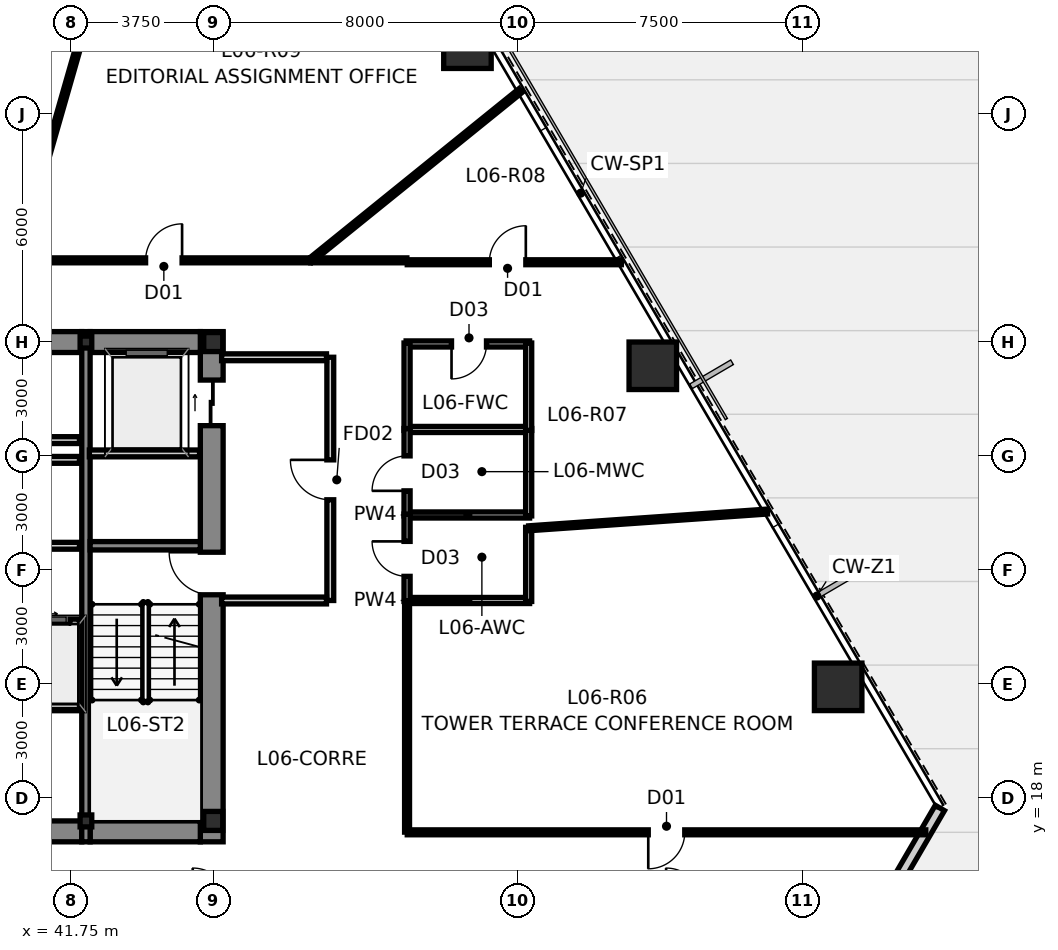
"""IFC4 building model, lengths in metres.
Left out: names, types, materials, properties, quantities, classifications, styles, units other than length and angle.
Written with IfcOpenShell. Run it as: python <this file> out.ifc"""

import sys

from ifc_helpers import new_model, si_unit, direction, frame, frame_2d, origin, origin_2d, place, context, subcontext, project, spatial, rectangle, hollow_rectangle, i_section, extrude, source, transform, mapped, element, fill, save


model = new_model("IFC4")
c1 = context("Model", 3, precision=1e-05, world=origin(), true_north=direction((0.0, 1.0)))
c2 = subcontext(c1, "Body", "Model", "MODEL_VIEW")
j1 = project(units=[si_unit("LENGTHUNIT", "METRE"), si_unit("PLANEANGLEUNIT", "RADIAN")], contexts=[c1])
p1 = place(None, origin())
s1 = spatial("IfcSite", under=j1, at=p1, CompositionType="ELEMENT")
p2 = place(p1, origin())
s2 = spatial("IfcBuilding", under=s1, at=p2, CompositionType="ELEMENT")
p3 = place(p2, frame((0.0, 0.0, 27.6)))
s3 = spatial("IfcBuildingStorey", under=s2, at=p3, CompositionType="ELEMENT", Elevation=27.6)
m1 = source(origin(), c2, "Body", "SweptSolid", [
    extrude(i_section(OverallWidth=0.5, OverallDepth=0.5, WebThickness=0.028, FlangeThickness=0.04, at=origin_2d()), origin(), (0.0, 0.0, 1.0), 3.65),
])
for number, where, z_axis, x_axis in (
    (1, (45.5, 17.4, 0.0), (0.0, 0.0, 1.0), (1.0, 0.0, 0.0)),
    (2, (45.5, 30.0, 0.0), (0.0, 0.0, 1.0), (1.0, 0.0, 0.0)),
):
    element("IfcColumn", number, at=place(p3, frame(where, z_axis=z_axis, x_axis=x_axis)), inside=s3, PredefinedType="COLUMN", context=c2, shape_type="MappedRepresentation", body=[
        mapped(m1, transform((0.0, 0.0, 0.0), scale=1.0)),
    ])
m2 = source(origin(), c2, "Body", "SweptSolid", [
    extrude(i_section(OverallWidth=0.307, OverallDepth=0.315, WebThickness=0.012, FlangeThickness=0.019, at=origin_2d()), origin(), (0.0, 0.0, 1.0), 3.65),
])
for number, where, z_axis, x_axis in (
    (3, (42.15, 17.4, 0.0), (0.0, 0.0, 1.0), (1.0, 0.0, 0.0)),
    (4, (42.15, 30.0, 0.0), (0.0, 0.0, 1.0), (1.0, 0.0, 0.0)),
):
    element("IfcColumn", number, at=place(p3, frame(where, z_axis=z_axis, x_axis=x_axis)), inside=s3, PredefinedType="COLUMN", context=c2, shape_type="MappedRepresentation", body=[
        mapped(m2, transform((0.0, 0.0, 0.0), scale=1.0)),
    ])
p4 = place(p3, frame((45.46, 16.85, 0.0), z_axis=(0.0, 0.0, 1.0), x_axis=(0.0, 1.0, 0.0)))
e5 = element("IfcWall", 5, at=p4, inside=s3, PredefinedType="SHEAR", context=c2, shape_type="SweptSolid", body=[
    extrude(rectangle(XDim=13.425, YDim=0.6, at=frame_2d((6.712, 0.0))), origin(), (0.0, 0.0, 1.0), 3.65),
])
p5 = place(p4, frame((6.5, 0.0, 0.0)))
e6 = element("IfcOpeningElement", 6, at=p5, cuts=e5, PredefinedType="OPENING", context=c2, shape_type="SweptSolid", body=[
    extrude(rectangle(XDim=1.12, YDim=2.15, at=frame_2d((0.56, 1.075))), frame((0.0, 0.312, 0.0), z_axis=(0.0, -1.0, 0.0), x_axis=(1.0, 0.0, 0.0)), (0.0, 0.0, 1.0), 0.624),
])
p6 = place(p4, frame((10.95, 0.0, 0.0)))
e7 = element("IfcOpeningElement", 7, at=p6, cuts=e5, PredefinedType="OPENING", context=c2, shape_type="SweptSolid", body=[
    extrude(rectangle(XDim=1.2, YDim=2.2, at=frame_2d((0.6, 1.1))), frame((0.0, 0.312, 0.0), z_axis=(0.0, -1.0, 0.0), x_axis=(1.0, 0.0, 0.0)), (0.0, 0.0, 1.0), 0.624),
])
p7 = place(p3, frame((33.96, 17.125, 0.0), z_axis=(0.0, 0.0, 1.0), x_axis=(1.0, 0.0, 0.0)))
e8 = element("IfcWall", 8, at=p7, inside=s3, PredefinedType="SHEAR", context=c2, shape_type="SweptSolid", body=[
    extrude(rectangle(XDim=8.08, YDim=0.55, at=frame_2d((4.04, 0.0))), origin(), (0.0, 0.0, 1.0), 3.65),
])
p8 = place(p3, frame((42.26, 17.125, 0.0), z_axis=(0.0, 0.0, 1.0), x_axis=(1.0, 0.0, 0.0)))
e9 = element("IfcWall", 9, at=p8, inside=s3, PredefinedType="SHEAR", context=c2, shape_type="SweptSolid", body=[
    extrude(rectangle(XDim=2.9, YDim=0.55, at=frame_2d((1.45, 0.0))), origin(), (0.0, 0.0, 1.0), 3.65),
])
p9 = place(p3, frame((40.16, 30.0, 0.0), z_axis=(0.0, 0.0, 1.0), x_axis=(1.0, 0.0, 0.0)))
e10 = element("IfcWall", 10, at=p9, inside=s3, PredefinedType="SHEAR", context=c2, shape_type="SweptSolid", body=[
    extrude(rectangle(XDim=1.88, YDim=0.55, at=frame_2d((0.94, 0.0))), origin(), (0.0, 0.0, 1.0), 3.65),
])
p10 = place(p3, frame((42.26, 30.0, 0.0), z_axis=(0.0, 0.0, 1.0), x_axis=(1.0, 0.0, 0.0)))
e11 = element("IfcWall", 11, at=p10, inside=s3, PredefinedType="SHEAR", context=c2, shape_type="SweptSolid", body=[
    extrude(rectangle(XDim=2.9, YDim=0.55, at=frame_2d((1.45, 0.0))), origin(), (0.0, 0.0, 1.0), 3.65),
])
p11 = place(p3, frame((42.15, 16.85, 0.0), z_axis=(0.0, 0.0, 1.0), x_axis=(0.0, 1.0, 0.0)))
e12 = element("IfcWall", 12, at=p11, inside=s3, PredefinedType="SHEAR", context=c2, shape_type="SweptSolid", body=[
    extrude(rectangle(XDim=13.425, YDim=0.22, at=frame_2d((6.712, 0.0))), origin(), (0.0, 0.0, 1.0), 3.65),
])
p12 = place(p3, frame((42.26, 24.64, 0.0), z_axis=(0.0, 0.0, 1.0), x_axis=(1.0, 0.0, 0.0)))
e13 = element("IfcWall", 13, at=p12, inside=s3, PredefinedType="SHEAR", context=c2, shape_type="SweptSolid", body=[
    extrude(rectangle(XDim=2.9, YDim=0.22, at=frame_2d((1.45, 0.0))), origin(), (0.0, 0.0, 1.0), 3.65),
])
m3 = source(origin(), c2, "Body", "SweptSolid", [
    extrude(hollow_rectangle(XDim=1.25, YDim=1.25, WallThickness=0.07, at=origin_2d()), origin(), (0.0, 0.0, 1.0), 3.651),
])
p13 = place(p3, frame((61.944, 20.928, 0.0), z_axis=(-0.010431795422, -0.021532295679, 0.999713727968), x_axis=(0.899947055326, -0.435999194506, 0.0)))
e14 = element("IfcColumn", 14, at=p13, inside=s3, PredefinedType="COLUMN", context=c2, shape_type="MappedRepresentation", body=[
    mapped(m3, transform((0.0, 0.0, 0.0), scale=1.0)),
])
m4 = source(origin(), c2, "Body", "SweptSolid", [
    extrude(hollow_rectangle(XDim=1.25, YDim=1.25, WallThickness=0.07, at=origin_2d()), origin(), (0.0, 0.0, 1.0), 3.651),
])
p14 = place(p3, frame((57.066, 29.376, 0.0), z_axis=(-0.014913313399, -0.013776424037, 0.999793880369), x_axis=(0.678553674548, -0.734550822447, 0.0)))
e15 = element("IfcColumn", 15, at=p14, inside=s3, PredefinedType="COLUMN", context=c2, shape_type="MappedRepresentation", body=[
    mapped(m4, transform((0.0, 0.0, 0.0), scale=1.0)),
])
m5 = source(origin(), c2, "Body", "SweptSolid", [
    extrude(hollow_rectangle(XDim=1.25, YDim=1.25, WallThickness=0.07, at=origin_2d()), origin(), (0.0, 0.0, 1.0), 3.901),
])
p15 = place(p3, frame((52.189, 37.824, -0.25), z_axis=(-0.018151222073, -0.005633137885, 0.999819384136), x_axis=(0.296399214872, -0.955064136811, 0.0)))
e16 = element("IfcColumn", 16, at=p15, inside=s3, PredefinedType="COLUMN", context=c2, shape_type="MappedRepresentation", body=[
    mapped(m5, transform((0.0, 0.0, 0.0), scale=1.0)),
])
p16 = place(p3, frame((64.621, 17.741, 0.0), z_axis=(0.0, 0.0, 1.0), x_axis=(-0.503266117349, -0.864131480233, 0.0)))
e17 = element("IfcWall", 17, at=p16, inside=s3, PredefinedType="STANDARD", context=c2, shape_type="SweptSolid", body=[
    extrude(rectangle(XDim=15.888, YDim=0.28, at=frame_2d((7.944, 0.0))), origin(), (0.0, 0.0, 1.0), 3.4),
])
p17 = place(p16, frame((6.19, 0.0, 0.0)))
e18 = element("IfcOpeningElement", 18, at=p17, cuts=e17, PredefinedType="OPENING", context=c2, shape_type="SweptSolid", body=[
    extrude(rectangle(XDim=1.1, YDim=2.2, at=frame_2d((0.55, 1.1))), frame((0.0, 0.152, 0.0), z_axis=(0.0, -1.0, 0.0), x_axis=(1.0, 0.0, 0.0)), (0.0, 0.0, 1.0), 0.304),
])
p18 = place(p3, frame((40.28, 22.62, 0.0), z_axis=(0.0, 0.0, 1.0), x_axis=(1.0, 0.0, 0.0)))
e19 = element("IfcWall", 19, at=p18, inside=s3, PredefinedType="PARTITIONING", context=c2, shape_type="SweptSolid", body=[
    extrude(rectangle(XDim=1.7, YDim=0.18, at=frame_2d((0.85, 0.0))), origin(), (0.0, 0.0, 1.0), 3.4),
])
p19 = place(p18, frame((0.35, 0.0, 0.0)))
e20 = element("IfcOpeningElement", 20, at=p19, cuts=e19, PredefinedType="OPENING", context=c2, shape_type="SweptSolid", body=[
    extrude(rectangle(XDim=1.1, YDim=2.2, at=frame_2d((0.55, 1.1))), frame((0.0, 0.102, 0.0), z_axis=(0.0, -1.0, 0.0), x_axis=(1.0, 0.0, 0.0)), (0.0, 0.0, 1.0), 0.204),
])
p20 = place(p3, frame((40.28, 26.9, 0.0), z_axis=(0.0, 0.0, 1.0), x_axis=(1.0, 0.0, 0.0)))
e21 = element("IfcWall", 21, at=p20, inside=s3, PredefinedType="PARTITIONING", context=c2, shape_type="SweptSolid", body=[
    extrude(rectangle(XDim=1.7, YDim=0.18, at=frame_2d((0.85, 0.0))), origin(), (0.0, 0.0, 1.0), 3.4),
])
p21 = place(p3, frame((40.2, 24.64, 0.0), z_axis=(0.0, 0.0, 1.0), x_axis=(1.0, 0.0, 0.0)))
e22 = element("IfcWall", 22, at=p21, inside=s3, PredefinedType="PARTITIONING", context=c2, shape_type="SweptSolid", body=[
    extrude(rectangle(XDim=1.78, YDim=0.18, at=frame_2d((0.89, 0.0))), origin(), (0.0, 0.0, 1.0), 3.4),
])
p22 = place(p3, frame((40.22, 27.42, 0.0), z_axis=(0.0, 0.0, 1.0), x_axis=(1.0, 0.0, 0.0)))
e23 = element("IfcWall", 23, at=p22, inside=s3, PredefinedType="PARTITIONING", context=c2, shape_type="SweptSolid", body=[
    extrude(rectangle(XDim=1.76, YDim=0.18, at=frame_2d((0.88, 0.0))), origin(), (0.0, 0.0, 1.0), 3.4),
])
p23 = place(p3, frame((48.58, 23.2, 0.0), z_axis=(0.0, 0.0, 1.0), x_axis=(0.0, 1.0, 0.0)))
e24 = element("IfcWall", 24, at=p23, inside=s3, PredefinedType="PARTITIONING", context=c2, shape_type="SweptSolid", body=[
    extrude(rectangle(XDim=6.4, YDim=0.18, at=frame_2d((3.2, 0.0))), origin(), (0.0, 0.0, 1.0), 3.4),
])
p24 = place(p23, frame((2.65, 0.0, 0.0)))
e25 = element("IfcOpeningElement", 25, at=p24, cuts=e24, PredefinedType="OPENING", context=c2, shape_type="SweptSolid", body=[
    extrude(rectangle(XDim=1.05, YDim=2.15, at=frame_2d((0.525, 1.075))), frame((0.0, 0.102, 0.0), z_axis=(0.0, -1.0, 0.0), x_axis=(1.0, 0.0, 0.0)), (0.0, 0.0, 1.0), 0.204),
])
p25 = place(p3, frame((45.72, 23.2, 0.0), z_axis=(0.0, 0.0, 1.0), x_axis=(1.0, 0.0, 0.0)))
e26 = element("IfcWall", 26, at=p25, inside=s3, PredefinedType="PARTITIONING", context=c2, shape_type="SweptSolid", body=[
    extrude(rectangle(XDim=2.76, YDim=0.18, at=frame_2d((1.38, 0.0))), origin(), (0.0, 0.0, 1.0), 3.4),
])
p26 = place(p3, frame((45.72, 29.6, 0.0), z_axis=(0.0, 0.0, 1.0), x_axis=(1.0, 0.0, 0.0)))
e27 = element("IfcWall", 27, at=p26, inside=s3, PredefinedType="PARTITIONING", context=c2, shape_type="SweptSolid", body=[
    extrude(rectangle(XDim=2.76, YDim=0.18, at=frame_2d((1.38, 0.0))), origin(), (0.0, 0.0, 1.0), 2.783),
])
p27 = place(p3, frame((42.24, 27.07, 0.0), z_axis=(0.0, 0.0, 1.0), x_axis=(1.0, 0.0, 0.0)))
e28 = element("IfcWall", 28, at=p27, inside=s3, PredefinedType="PARTITIONING", context=c2, shape_type="SweptSolid", body=[
    extrude(rectangle(XDim=2.9, YDim=0.18, at=frame_2d((1.45, 0.0))), origin(), (0.0, 0.0, 1.0), 3.4),
])
p28 = place(p3, frame((40.22, 20.42, 0.0), z_axis=(0.0, 0.0, 1.0), x_axis=(1.0, 0.0, 0.0)))
e29 = element("IfcWall", 29, at=p28, inside=s3, PredefinedType="PARTITIONING", context=c2, shape_type="SweptSolid", body=[
    extrude(rectangle(XDim=1.76, YDim=0.18, at=frame_2d((0.88, 0.0))), origin(), (0.0, 0.0, 1.0), 3.4),
])
for number, where, z_axis, x_axis in (
    (30, (50.575, 23.2, 0.0), (0.0, 0.0, 1.0), (1.0, 0.0, 0.0)),
    (31, (50.575, 25.45, 0.0), (0.0, 0.0, 1.0), (1.0, 0.0, 0.0)),
    (32, (50.575, 27.7, 0.0), (0.0, 0.0, 1.0), (1.0, 0.0, 0.0)),
):
    element("IfcWall", number, at=place(p3, frame(where, z_axis=z_axis, x_axis=x_axis)), inside=s3, PredefinedType="PLUMBINGWALL", context=c2, shape_type="SweptSolid", body=[
        extrude(rectangle(XDim=3.25, YDim=0.16, at=frame_2d((1.625, 0.0))), origin(), (0.0, 0.0, 1.0), 3.4),
    ])
p29 = place(p3, frame((53.825, 29.95, 0.0), z_axis=(0.0, 0.0, 1.0), x_axis=(-1.0, 0.0, 0.0)))
e33 = element("IfcWall", 33, at=p29, inside=s3, PredefinedType="PLUMBINGWALL", context=c2, shape_type="SweptSolid", body=[
    extrude(rectangle(XDim=3.25, YDim=0.16, at=frame_2d((1.625, 0.0))), origin(), (0.0, 0.0, 1.0), 2.783),
])
p30 = place(p29, frame((1.135, 0.0, 0.0)))
e34 = element("IfcOpeningElement", 34, at=p30, cuts=e33, PredefinedType="OPENING", context=c2, shape_type="SweptSolid", body=[
    extrude(rectangle(XDim=0.92, YDim=2.1, at=frame_2d((0.46, 1.05))), frame((0.0, 0.092, 0.0), z_axis=(0.0, -1.0, 0.0), x_axis=(1.0, 0.0, 0.0)), (0.0, 0.0, 1.0), 0.184),
])
p31 = place(p3, frame((50.6, 27.675, 0.0), z_axis=(0.0, 0.0, 1.0), x_axis=(0.0, 1.0, 0.0)))
e35 = element("IfcWall", 35, at=p31, inside=s3, PredefinedType="PLUMBINGWALL", context=c2, shape_type="SweptSolid", body=[
    extrude(rectangle(XDim=2.3, YDim=0.16, at=frame_2d((1.15, 0.0))), origin(), (0.0, 0.0, 1.0), 3.4),
])
p32 = place(p3, frame((50.6, 25.425, 0.0), z_axis=(0.0, 0.0, 1.0), x_axis=(0.0, 1.0, 0.0)))
e36 = element("IfcWall", 36, at=p32, inside=s3, PredefinedType="PLUMBINGWALL", context=c2, shape_type="SweptSolid", body=[
    extrude(rectangle(XDim=2.3, YDim=0.16, at=frame_2d((1.15, 0.0))), origin(), (0.0, 0.0, 1.0), 3.4),
])
p33 = place(p32, frame((0.66, 0.0, 0.0)))
e37 = element("IfcOpeningElement", 37, at=p33, cuts=e36, PredefinedType="OPENING", context=c2, shape_type="SweptSolid", body=[
    extrude(rectangle(XDim=0.92, YDim=2.1, at=frame_2d((0.46, 1.05))), frame((0.0, 0.092, 0.0), z_axis=(0.0, -1.0, 0.0), x_axis=(1.0, 0.0, 0.0)), (0.0, 0.0, 1.0), 0.184),
])
p34 = place(p3, frame((50.6, 23.175, 0.0), z_axis=(0.0, 0.0, 1.0), x_axis=(0.0, 1.0, 0.0)))
e38 = element("IfcWall", 38, at=p34, inside=s3, PredefinedType="PLUMBINGWALL", context=c2, shape_type="SweptSolid", body=[
    extrude(rectangle(XDim=2.3, YDim=0.16, at=frame_2d((1.15, 0.0))), origin(), (0.0, 0.0, 1.0), 3.026),
])
p35 = place(p34, frame((0.66, 0.0, 0.0)))
e39 = element("IfcOpeningElement", 39, at=p35, cuts=e38, PredefinedType="OPENING", context=c2, shape_type="SweptSolid", body=[
    extrude(rectangle(XDim=0.92, YDim=2.1, at=frame_2d((0.46, 1.05))), frame((0.0, 0.092, 0.0), z_axis=(0.0, -1.0, 0.0), x_axis=(1.0, 0.0, 0.0)), (0.0, 0.0, 1.0), 0.184),
])
for number, where, z_axis, x_axis in (
    (40, (53.8, 25.425, 0.0), (0.0, 0.0, 1.0), (0.0, 1.0, 0.0)),
    (41, (53.8, 27.675, 0.0), (0.0, 0.0, 1.0), (0.0, 1.0, 0.0)),
):
    element("IfcWall", number, at=place(p3, frame(where, z_axis=z_axis, x_axis=x_axis)), inside=s3, PredefinedType="PLUMBINGWALL", context=c2, shape_type="SweptSolid", body=[
        extrude(rectangle(XDim=2.3, YDim=0.16, at=frame_2d((1.15, 0.0))), origin(), (0.0, 0.0, 1.0), 3.026),
    ])
p36 = place(p3, frame((53.8, 23.175, 0.0), z_axis=(0.0, 0.0, 1.0), x_axis=(0.0, 1.0, 0.0)))
e42 = element("IfcWall", 42, at=p36, inside=s3, PredefinedType="PLUMBINGWALL", context=c2, shape_type="SweptSolid", body=[
    extrude(rectangle(XDim=1.95, YDim=0.16, at=frame_2d((0.975, 0.0))), origin(), (0.0, 0.0, 1.0), 3.4),
])
p37 = place(p3, frame((40.341, 32.155, 0.0), z_axis=(0.0, 0.0, 1.0), x_axis=(0.275627948864, 0.961264393289, 0.0)))
e43 = element("IfcWall", 43, at=p37, inside=s3, PredefinedType="PARTITIONING", context=c2, shape_type="SweptSolid", body=[
    extrude(rectangle(XDim=17.919, YDim=0.13, at=frame_2d((8.959, 0.0))), origin(), (0.0, 0.0, 1.0), 3.4),
])
p38 = place(p3, frame((64.25, 17.1, 0.0), z_axis=(0.0, 0.0, 1.0), x_axis=(-1.0, 0.0, 0.0)))
e44 = element("IfcWall", 44, at=p38, inside=s3, PredefinedType="PARTITIONING", context=c2, shape_type="SweptSolid", body=[
    extrude(rectangle(XDim=13.645, YDim=0.13, at=frame_2d((6.823, 0.0))), origin(), (0.0, 0.0, 1.0), 3.4),
])
p39 = place(p38, frame((6.343, 0.0, 0.0)))
e45 = element("IfcOpeningElement", 45, at=p39, cuts=e44, PredefinedType="OPENING", context=c2, shape_type="SweptSolid", body=[
    extrude(rectangle(XDim=0.96, YDim=2.15, at=frame_2d((0.48, 1.075))), frame((0.0, 0.077, 0.0), z_axis=(0.0, -1.0, 0.0), x_axis=(1.0, 0.0, 0.0)), (0.0, 0.0, 1.0), 0.154),
])
p40 = place(p3, frame((40.345, 32.15, 0.0), z_axis=(0.0, 0.0, 1.0), x_axis=(1.0, 0.0, 0.0)))
e46 = element("IfcWall", 46, at=p40, inside=s3, PredefinedType="PARTITIONING", context=c2, shape_type="SweptSolid", body=[
    extrude(rectangle(XDim=7.71, YDim=0.13, at=frame_2d((3.855, 0.0))), origin(), (0.0, 0.0, 1.0), 3.4),
])
p41 = place(p40, frame((3.375, 0.0, 0.0)))
e47 = element("IfcOpeningElement", 47, at=p41, cuts=e46, PredefinedType="OPENING", context=c2, shape_type="SweptSolid", body=[
    extrude(rectangle(XDim=0.96, YDim=2.15, at=frame_2d((0.48, 1.075))), frame((0.0, 0.077, 0.0), z_axis=(0.0, -1.0, 0.0), x_axis=(1.0, 0.0, 0.0)), (0.0, 0.0, 1.0), 0.154),
])
p42 = place(p3, frame((48.064, 32.153, 0.0), z_axis=(0.0, 0.0, 1.0), x_axis=(0.777691139516, 0.628646555322, 0.0)))
e48 = element("IfcWall", 48, at=p42, inside=s3, PredefinedType="PARTITIONING", context=c2, shape_type="SweptSolid", body=[
    extrude(rectangle(XDim=7.106, YDim=0.13, at=frame_2d((3.553, 0.0))), origin(), (0.0, 0.0, 1.0), 3.4),
])
p43 = place(p3, frame((53.805, 25.1, 0.0), z_axis=(0.0, 0.0, 1.0), x_axis=(0.997551418552, 0.069936881151, 0.0)))
e49 = element("IfcWall", 49, at=p43, inside=s3, PredefinedType="PARTITIONING", context=c2, shape_type="SweptSolid", body=[
    extrude(rectangle(XDim=6.291, YDim=0.13, at=frame_2d((3.145, 0.0))), origin(), (0.0, 0.0, 1.0), 3.4),
])
p44 = place(p3, frame((50.6, 17.105, 0.0), z_axis=(0.0, 0.0, 1.0), x_axis=(0.0, 1.0, 0.0)))
e50 = element("IfcWall", 50, at=p44, inside=s3, PredefinedType="PARTITIONING", context=c2, shape_type="SweptSolid", body=[
    extrude(rectangle(XDim=6.09, YDim=0.13, at=frame_2d((3.045, 0.0))), origin(), (0.0, 0.0, 1.0), 3.026),
])
p45 = place(p3, frame((50.605, 32.1, 0.0), z_axis=(0.0, 0.0, 1.0), x_axis=(1.0, 0.0, 0.0)))
e51 = element("IfcWall", 51, at=p45, inside=s3, PredefinedType="PARTITIONING", context=c2, shape_type="SweptSolid", body=[
    extrude(rectangle(XDim=5.635, YDim=0.13, at=frame_2d((2.817, 0.0))), origin(), (0.0, 0.0, 1.0), 3.4),
])
p46 = place(p45, frame((2.16, 0.0, 0.0)))
e52 = element("IfcOpeningElement", 52, at=p46, cuts=e51, PredefinedType="OPENING", context=c2, shape_type="SweptSolid", body=[
    extrude(rectangle(XDim=0.96, YDim=2.15, at=frame_2d((0.48, 1.075))), frame((0.0, 0.077, 0.0), z_axis=(0.0, -1.0, 0.0), x_axis=(1.0, 0.0, 0.0)), (0.0, 0.0, 1.0), 0.154),
])
p47 = place(p3, frame((48.065, 32.15, 0.0), z_axis=(0.0, 0.0, 1.0), x_axis=(1.0, 0.0, 0.0)))
e53 = element("IfcWall", 53, at=p47, inside=s3, PredefinedType="PARTITIONING", context=c2, shape_type="SweptSolid", body=[
    extrude(rectangle(XDim=2.53, YDim=0.13, at=frame_2d((1.265, 0.0))), origin(), (0.0, 0.0, 1.0), 3.4),
])
p48 = place(p5, origin())
e54 = element("IfcDoor", 54, at=p48, inside=s3, OperationType="SINGLE_SWING_RIGHT", PredefinedType="DOOR", context=c2, shape_type="SweptSolid", body=[
    extrude(rectangle(XDim=1.12, YDim=2.15, at=frame_2d((0.56, 1.075))), frame((0.0, 0.025, 0.0), z_axis=(0.0, -1.0, 0.0), x_axis=(1.0, 0.0, 0.0)), (0.0, 0.0, 1.0), 0.05),
])
fill(e6, e54)
p49 = place(p6, origin())
e55 = element("IfcDoor", 55, at=p49, inside=s3, OperationType="SLIDING_TO_RIGHT", PredefinedType="DOOR", context=c2, shape_type="SweptSolid", body=[
    extrude(rectangle(XDim=1.2, YDim=2.2, at=frame_2d((0.6, 1.1))), frame((0.0, 0.025, 0.0), z_axis=(0.0, -1.0, 0.0), x_axis=(1.0, 0.0, 0.0)), (0.0, 0.0, 1.0), 0.05),
])
fill(e7, e55)
p50 = place(p19, origin())
e56 = element("IfcDoor", 56, at=p50, inside=s3, OperationType="SLIDING_TO_LEFT", PredefinedType="DOOR", context=c2, shape_type="SweptSolid", body=[
    extrude(rectangle(XDim=1.1, YDim=2.2, at=frame_2d((0.55, 1.1))), frame((0.0, 0.025, 0.0), z_axis=(0.0, -1.0, 0.0), x_axis=(1.0, 0.0, 0.0)), (0.0, 0.0, 1.0), 0.05),
])
fill(e20, e56)
p51 = place(p24, origin())
e57 = element("IfcDoor", 57, at=p51, inside=s3, OperationType="SINGLE_SWING_RIGHT", PredefinedType="DOOR", context=c2, shape_type="SweptSolid", body=[
    extrude(rectangle(XDim=1.05, YDim=2.15, at=frame_2d((0.525, 1.075))), frame((0.0, 0.025, 0.0), z_axis=(0.0, -1.0, 0.0), x_axis=(1.0, 0.0, 0.0)), (0.0, 0.0, 1.0), 0.05),
])
fill(e25, e57)
p52 = place(p30, origin())
e58 = element("IfcDoor", 58, at=p52, inside=s3, OperationType="SINGLE_SWING_RIGHT", PredefinedType="DOOR", context=c2, shape_type="SweptSolid", body=[
    extrude(rectangle(XDim=0.92, YDim=2.1, at=frame_2d((0.46, 1.05))), frame((0.0, 0.025, 0.0), z_axis=(0.0, -1.0, 0.0), x_axis=(1.0, 0.0, 0.0)), (0.0, 0.0, 1.0), 0.05),
])
fill(e34, e58)
p53 = place(p33, origin())
e59 = element("IfcDoor", 59, at=p53, inside=s3, OperationType="SINGLE_SWING_LEFT", PredefinedType="DOOR", context=c2, shape_type="SweptSolid", body=[
    extrude(rectangle(XDim=0.92, YDim=2.1, at=frame_2d((0.46, 1.05))), frame((0.0, 0.025, 0.0), z_axis=(0.0, -1.0, 0.0), x_axis=(1.0, 0.0, 0.0)), (0.0, 0.0, 1.0), 0.05),
])
fill(e37, e59)
p54 = place(p35, origin())
e60 = element("IfcDoor", 60, at=p54, inside=s3, OperationType="SINGLE_SWING_RIGHT", PredefinedType="DOOR", context=c2, shape_type="SweptSolid", body=[
    extrude(rectangle(XDim=0.92, YDim=2.1, at=frame_2d((0.46, 1.05))), frame((0.0, 0.025, 0.0), z_axis=(0.0, -1.0, 0.0), x_axis=(1.0, 0.0, 0.0)), (0.0, 0.0, 1.0), 0.05),
])
fill(e39, e60)
p55 = place(p39, origin())
e61 = element("IfcDoor", 61, at=p55, inside=s3, OperationType="SINGLE_SWING_RIGHT", PredefinedType="DOOR", context=c2, shape_type="SweptSolid", body=[
    extrude(rectangle(XDim=0.96, YDim=2.15, at=frame_2d((0.48, 1.075))), frame((0.0, 0.025, 0.0), z_axis=(0.0, -1.0, 0.0), x_axis=(1.0, 0.0, 0.0)), (0.0, 0.0, 1.0), 0.05),
])
fill(e45, e61)
p56 = place(p41, origin())
e62 = element("IfcDoor", 62, at=p56, inside=s3, OperationType="SINGLE_SWING_RIGHT", PredefinedType="DOOR", context=c2, shape_type="SweptSolid", body=[
    extrude(rectangle(XDim=0.96, YDim=2.15, at=frame_2d((0.48, 1.075))), frame((0.0, 0.025, 0.0), z_axis=(0.0, -1.0, 0.0), x_axis=(1.0, 0.0, 0.0)), (0.0, 0.0, 1.0), 0.05),
])
fill(e47, e62)
p57 = place(p46, origin())
e63 = element("IfcDoor", 63, at=p57, inside=s3, OperationType="SINGLE_SWING_RIGHT", PredefinedType="DOOR", context=c2, shape_type="SweptSolid", body=[
    extrude(rectangle(XDim=0.96, YDim=2.15, at=frame_2d((0.48, 1.075))), frame((0.0, 0.025, 0.0), z_axis=(0.0, -1.0, 0.0), x_axis=(1.0, 0.0, 0.0)), (0.0, 0.0, 1.0), 0.05),
])
fill(e52, e63)
save(model, sys.argv[1])
